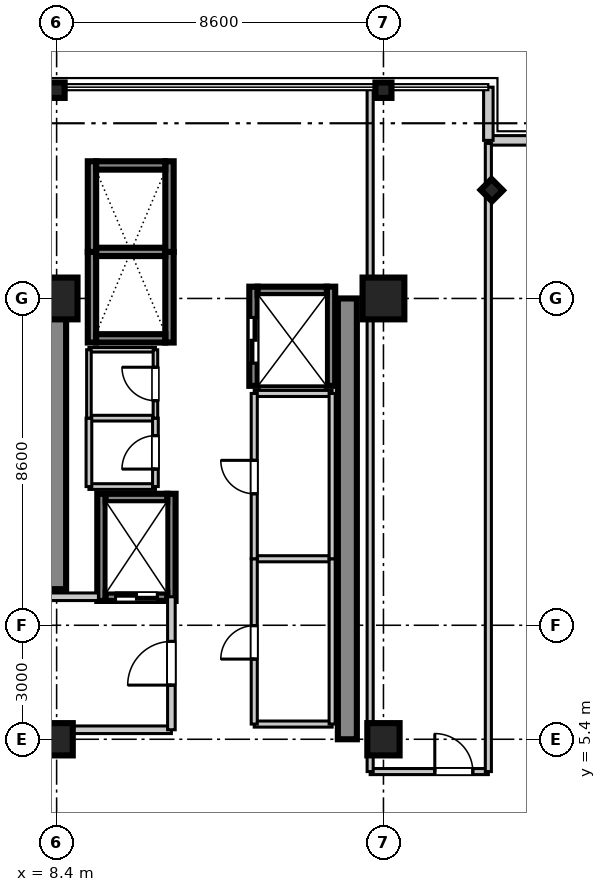
"""IFC4 building model, lengths in metres.
Left out: names, types, materials, properties, quantities, classifications, styles, units other than length and angle.
Written with IfcOpenShell. Run it as: python <this file> out.ifc"""

import sys

from ifc_helpers import new_model, si_unit, direction, frame, frame_2d, origin, origin_2d, place, context, subcontext, project, spatial, rectangle, i_section, extrude, source, transform, mapped, element, fill, save


model = new_model("IFC4")
c1 = context("Model", 3, precision=1e-05, world=origin(), true_north=direction((0.0, 1.0)))
c2 = subcontext(c1, "Body", "Model", "MODEL_VIEW")
j1 = project(units=[si_unit("LENGTHUNIT", "METRE"), si_unit("PLANEANGLEUNIT", "RADIAN")], contexts=[c1])
p1 = place(None, origin())
s1 = spatial("IfcSite", under=j1, at=p1, CompositionType="ELEMENT")
p2 = place(p1, origin())
s2 = spatial("IfcBuilding", under=s1, at=p2, CompositionType="ELEMENT")
p3 = place(p2, frame((0.0, 0.0, 185.5)))
s3 = spatial("IfcBuildingStorey", under=s2, at=p3, CompositionType="ELEMENT", Elevation=185.5)
m1 = source(origin(), c2, "Body", "SweptSolid", [
    extrude(rectangle(XDim=0.85, YDim=0.85, at=origin_2d()), origin(), (0.0, 0.0, 1.0), 3.605),
])
p4 = place(p3, frame((8.4, 5.4, 0.0), z_axis=(0.0, 0.0, 1.0), x_axis=(1.0, 0.0, 0.0)))
e1 = element("IfcColumn", 1, at=p4, inside=s3, PredefinedType="PILASTER", context=c2, shape_type="MappedRepresentation", body=[
    mapped(m1, transform((0.0, 0.0, 0.0), scale=1.0)),
])
m2 = source(origin(), c2, "Body", "SweptSolid", [
    extrude(rectangle(XDim=1.1, YDim=1.1, at=origin_2d()), origin(), (0.0, 0.0, 1.0), 3.605),
])
p5 = place(p3, frame((8.4, 17.0, 0.0), z_axis=(0.0, 0.0, 1.0), x_axis=(1.0, 0.0, 0.0)))
e2 = element("IfcColumn", 2, at=p5, inside=s3, PredefinedType="COLUMN", context=c2, shape_type="MappedRepresentation", body=[
    mapped(m2, transform((0.0, 0.0, 0.0), scale=1.0)),
])
p6 = place(p3, frame((17.0, 5.4, 0.0), z_axis=(0.0, 0.0, 1.0), x_axis=(1.0, 0.0, 0.0)))
e3 = element("IfcColumn", 3, at=p6, inside=s3, PredefinedType="PILASTER", context=c2, shape_type="MappedRepresentation", body=[
    mapped(m1, transform((0.0, 0.0, 0.0), scale=1.0)),
])
p7 = place(p3, frame((17.0, 17.0, 0.0), z_axis=(0.0, 0.0, 1.0), x_axis=(1.0, 0.0, 0.0)))
e4 = element("IfcColumn", 4, at=p7, inside=s3, PredefinedType="COLUMN", context=c2, shape_type="MappedRepresentation", body=[
    mapped(m2, transform((0.0, 0.0, 0.0), scale=1.0)),
])
m3 = source(origin(), c2, "Body", "SweptSolid", [
    extrude(i_section(OverallWidth=0.406, OverallDepth=0.422, WebThickness=0.019, FlangeThickness=0.03, at=origin_2d()), origin(), (0.0, 0.0, 1.0), 3.605),
])
for number, where, z_axis, x_axis in (
    (5, (8.4, 22.48, 0.0), (0.0, 0.0, 1.0), (0.0, 1.0, 0.0)),
    (6, (17.0, 22.48, 0.0), (0.0, 0.0, 1.0), (0.0, 1.0, 0.0)),
    (7, (19.85, 19.85, 0.0), (0.0, 0.0, 1.0), (0.707, 0.707, 0.0)),
):
    element("IfcColumn", number, at=place(p3, frame(where, z_axis=z_axis, x_axis=x_axis)), inside=s3, PredefinedType="COLUMN", context=c2, shape_type="MappedRepresentation", body=[
        mapped(m3, transform((0.0, 0.0, 0.0), scale=1.0)),
    ])
m4 = source(origin(), c2, "Body", "SweptSolid", [
    extrude(rectangle(XDim=7.65, YDim=0.5, at=frame_2d((3.825, 0.0))), origin(), (0.0, 0.0, 1.0), 3.39),
])
p8 = place(p3, frame((8.4, 9.35, 0.0), z_axis=(0.0, 0.0, 1.0), x_axis=(0.0, 1.0, 0.0)))
e8 = element("IfcWall", 8, at=p8, inside=s3, PredefinedType="SHEAR", context=c2, shape_type="MappedRepresentation", body=[
    mapped(m4, transform((0.0, 0.0, 0.0), scale=1.0)),
])
m5 = source(origin(), c2, "Body", "SweptSolid", [
    extrude(rectangle(XDim=11.6, YDim=0.5, at=frame_2d((5.8, 0.0))), origin(), (0.0, 0.0, 1.0), 3.39),
])
p9 = place(p3, frame((16.05, 5.4, 0.0), z_axis=(0.0, 0.0, 1.0), x_axis=(0.0, 1.0, 0.0)))
e9 = element("IfcWall", 9, at=p9, inside=s3, PredefinedType="SHEAR", context=c2, shape_type="MappedRepresentation", body=[
    mapped(m5, transform((0.0, 0.0, 0.0), scale=1.0)),
])
m6 = source(origin(), c2, "Body", "SweptSolid", [
    extrude(rectangle(XDim=2.385, YDim=0.22, at=frame_2d((1.192, 0.0))), origin(), (0.0, 0.0, 1.0), 3.39),
])
for number, where, z_axis, x_axis in (
    (10, (9.33, 15.84, 0.0), (0.0, 0.0, 1.0), (0.0, 1.0, 0.0)),
    (11, (11.37, 15.84, 0.0), (0.0, 0.0, 1.0), (0.0, 1.0, 0.0)),
):
    element("IfcWall", number, at=place(p3, frame(where, z_axis=z_axis, x_axis=x_axis)), inside=s3, PredefinedType="SHEAR", context=c2, shape_type="MappedRepresentation", body=[
        mapped(m6, transform((0.0, 0.0, 0.0), scale=1.0)),
    ])
m7 = source(origin(), c2, "Body", "SweptSolid", [
    extrude(rectangle(XDim=1.82, YDim=0.22, at=frame_2d((0.91, 0.0))), origin(), (0.0, 0.0, 1.0), 3.39),
])
p10 = place(p3, frame((9.44, 15.95, 0.0), z_axis=(0.0, 0.0, 1.0), x_axis=(1.0, 0.0, 0.0)))
e12 = element("IfcWall", 12, at=p10, inside=s3, PredefinedType="SHEAR", context=c2, shape_type="MappedRepresentation", body=[
    mapped(m7, transform((0.0, 0.0, 0.0), scale=1.0)),
])
m8 = source(origin(), c2, "Body", "SweptSolid", [
    extrude(rectangle(XDim=1.82, YDim=0.22, at=frame_2d((0.91, 0.0))), origin(), (0.0, 0.0, 1.0), 3.65),
])
p11 = place(p3, frame((9.44, 18.225, 0.0), z_axis=(0.0, 0.0, 1.0), x_axis=(1.0, 0.0, 0.0)))
e13 = element("IfcWall", 13, at=p11, inside=s3, PredefinedType="SHEAR", context=c2, shape_type="MappedRepresentation", body=[
    mapped(m8, transform((0.0, 0.0, 0.0), scale=1.0)),
])
for number, where, z_axis, x_axis in (
    (14, (9.33, 18.225, 0.0), (0.0, 0.0, 1.0), (0.0, 1.0, 0.0)),
    (15, (11.37, 18.225, 0.0), (0.0, 0.0, 1.0), (0.0, 1.0, 0.0)),
):
    element("IfcWall", number, at=place(p3, frame(where, z_axis=z_axis, x_axis=x_axis)), inside=s3, PredefinedType="SHEAR", context=c2, shape_type="MappedRepresentation", body=[
        mapped(m6, transform((0.0, 0.0, 0.0), scale=1.0)),
    ])
p12 = place(p3, frame((9.44, 20.5, 0.0), z_axis=(0.0, 0.0, 1.0), x_axis=(1.0, 0.0, 0.0)))
e16 = element("IfcWall", 16, at=p12, inside=s3, PredefinedType="SHEAR", context=c2, shape_type="MappedRepresentation", body=[
    mapped(m7, transform((0.0, 0.0, 0.0), scale=1.0)),
])
m9 = source(origin(), c2, "Body", "SweptSolid", [
    extrude(rectangle(XDim=2.82, YDim=0.22, at=frame_2d((1.41, 0.0))), origin(), (0.0, 0.0, 1.0), 3.39),
])
for number, where, z_axis, x_axis in (
    (17, (9.58, 9.04, 0.0), (0.0, 0.0, 1.0), (0.0, 1.0, 0.0)),
    (18, (11.42, 9.04, 0.0), (0.0, 0.0, 1.0), (0.0, 1.0, 0.0)),
):
    element("IfcWall", number, at=place(p3, frame(where, z_axis=z_axis, x_axis=x_axis)), inside=s3, PredefinedType="SHEAR", context=c2, shape_type="MappedRepresentation", body=[
        mapped(m9, transform((0.0, 0.0, 0.0), scale=1.0)),
    ])
m10 = source(origin(), c2, "Body", "SweptSolid", [
    extrude(rectangle(XDim=1.62, YDim=0.22, at=frame_2d((0.81, 0.0))), origin(), (0.0, 0.0, 1.0), 3.39),
])
p13 = place(p3, frame((9.69, 9.15, 0.0), z_axis=(0.0, 0.0, 1.0), x_axis=(1.0, 0.0, 0.0)))
e19 = element("IfcWall", 19, at=p13, inside=s3, PredefinedType="SHEAR", context=c2, shape_type="MappedRepresentation", body=[
    mapped(m10, transform((0.0, 0.0, 0.0), scale=1.0)),
])
p14 = place(p13, frame((0.26, 0.0, 0.0)))
e20 = element("IfcOpeningElement", 20, at=p14, cuts=e19, PredefinedType="OPENING", context=c2, shape_type="SweptSolid", body=[
    extrude(rectangle(XDim=1.1, YDim=2.2, at=frame_2d((0.55, 1.1))), frame((0.0, 0.12, 0.0), z_axis=(0.0, -1.0, 0.0), x_axis=(1.0, 0.0, 0.0)), (0.0, 0.0, 1.0), 0.24),
])
p15 = place(p3, frame((9.69, 11.75, 0.0), z_axis=(0.0, 0.0, 1.0), x_axis=(1.0, 0.0, 0.0)))
e21 = element("IfcWall", 21, at=p15, inside=s3, PredefinedType="SHEAR", context=c2, shape_type="MappedRepresentation", body=[
    mapped(m10, transform((0.0, 0.0, 0.0), scale=1.0)),
])
m11 = source(origin(), c2, "Body", "SweptSolid", [
    extrude(rectangle(XDim=2.61, YDim=0.22, at=frame_2d((1.305, 0.0))), origin(), (0.0, 0.0, 1.0), 3.39),
])
p16 = place(p3, frame((13.58, 14.7, 0.0), z_axis=(0.0, 0.0, 1.0), x_axis=(0.0, 1.0, 0.0)))
e22 = element("IfcWall", 22, at=p16, inside=s3, PredefinedType="SHEAR", context=c2, shape_type="MappedRepresentation", body=[
    mapped(m11, transform((0.0, 0.0, 0.0), scale=1.0)),
])
p17 = place(p16, frame((0.6, 0.0, 0.0)))
e23 = element("IfcOpeningElement", 23, at=p17, cuts=e22, PredefinedType="OPENING", context=c2, shape_type="SweptSolid", body=[
    extrude(rectangle(XDim=1.2, YDim=2.2, at=frame_2d((0.6, 1.1))), frame((0.0, 0.12, 0.0), z_axis=(0.0, -1.0, 0.0), x_axis=(1.0, 0.0, 0.0)), (0.0, 0.0, 1.0), 0.24),
])
p18 = place(p3, frame((15.62, 14.7, 0.0), z_axis=(0.0, 0.0, 1.0), x_axis=(0.0, 1.0, 0.0)))
e24 = element("IfcWall", 24, at=p18, inside=s3, PredefinedType="SHEAR", context=c2, shape_type="MappedRepresentation", body=[
    mapped(m11, transform((0.0, 0.0, 0.0), scale=1.0)),
])
p19 = place(p3, frame((13.69, 17.2, 0.0), z_axis=(0.0, 0.0, 1.0), x_axis=(1.0, 0.0, 0.0)))
e25 = element("IfcWall", 25, at=p19, inside=s3, PredefinedType="SHEAR", context=c2, shape_type="MappedRepresentation", body=[
    mapped(m7, transform((0.0, 0.0, 0.0), scale=1.0)),
])
m12 = source(origin(), c2, "Body", "SweptSolid", [
    extrude(rectangle(XDim=1.4, YDim=0.25, at=frame_2d((0.7, 0.0))), origin(), (0.0, 0.0, 1.0), 3.39),
])
p20 = place(p3, frame((19.76, 21.16, 0.0), z_axis=(0.0, 0.0, 1.0), x_axis=(1.0, 0.0, 0.0)))
e26 = element("IfcWall", 26, at=p20, inside=s3, PredefinedType="STANDARD", context=c2, shape_type="MappedRepresentation", body=[
    mapped(m12, transform((0.0, 0.0, 0.0), scale=1.0)),
])
m13 = source(origin(), c2, "Body", "SweptSolid", [
    extrude(rectangle(XDim=1.4, YDim=0.25, at=frame_2d((0.7, 0.0))), origin(), (0.0, 0.0, 1.0), 3.39),
])
p21 = place(p3, frame((19.76, 21.16, 0.0), z_axis=(0.0, 0.0, 1.0), x_axis=(0.0, 1.0, 0.0)))
e27 = element("IfcWall", 27, at=p21, inside=s3, PredefinedType="STANDARD", context=c2, shape_type="MappedRepresentation", body=[
    mapped(m13, transform((0.0, 0.0, 0.0), scale=1.0)),
])
m14 = source(origin(), c2, "Body", "SweptSolid", [
    extrude(rectangle(XDim=3.82, YDim=0.2, at=frame_2d((1.91, 0.0))), origin(), (0.0, 0.0, 1.0), 2.73),
])
p22 = place(p3, frame((7.6, 5.65, 0.0), z_axis=(0.0, 0.0, 1.0), x_axis=(1.0, 0.0, 0.0)))
e28 = element("IfcWall", 28, at=p22, inside=s3, PredefinedType="PARTITIONING", context=c2, shape_type="MappedRepresentation", body=[
    mapped(m14, transform((0.0, 0.0, 0.0), scale=1.0)),
])
m15 = source(origin(), c2, "Body", "SweptSolid", [
    extrude(rectangle(XDim=1.9, YDim=0.2, at=frame_2d((0.95, 0.0))), origin(), (0.0, 0.0, 1.0), 2.73),
])
p23 = place(p3, frame((7.6, 9.15, 0.0), z_axis=(0.0, 0.0, 1.0), x_axis=(1.0, 0.0, 0.0)))
e29 = element("IfcWall", 29, at=p23, inside=s3, PredefinedType="PARTITIONING", context=c2, shape_type="MappedRepresentation", body=[
    mapped(m15, transform((0.0, 0.0, 0.0), scale=1.0)),
])
m16 = source(origin(), c2, "Body", "SweptSolid", [
    extrude(rectangle(XDim=3.5, YDim=0.2, at=frame_2d((1.75, 0.0))), origin(), (0.0, 0.0, 1.0), 2.73),
])
p24 = place(p3, frame((11.42, 5.65, 0.0), z_axis=(0.0, 0.0, 1.0), x_axis=(0.0, 1.0, 0.0)))
e30 = element("IfcWall", 30, at=p24, inside=s3, PredefinedType="PARTITIONING", context=c2, shape_type="MappedRepresentation", body=[
    mapped(m16, transform((0.0, 0.0, 0.0), scale=1.0)),
])
p25 = place(p24, frame((1.175, 0.0, 0.0)))
e31 = element("IfcOpeningElement", 31, at=p25, cuts=e30, PredefinedType="OPENING", context=c2, shape_type="SweptSolid", body=[
    extrude(rectangle(XDim=1.15, YDim=2.15, at=frame_2d((0.575, 1.075))), frame((0.0, 0.11, 0.0), z_axis=(0.0, -1.0, 0.0), x_axis=(1.0, 0.0, 0.0)), (0.0, 0.0, 1.0), 0.22),
])
m17 = source(origin(), c2, "Body", "SweptSolid", [
    extrude(rectangle(XDim=1.75, YDim=0.15, at=frame_2d((0.875, 0.0))), origin(), (0.0, 0.0, 1.0), 2.73),
])
for number, where, z_axis, x_axis in (
    (32, (9.25, 12.05, 0.0), (0.0, 0.0, 1.0), (1.0, 0.0, 0.0)),
    (33, (9.25, 13.85, 0.0), (0.0, 0.0, 1.0), (1.0, 0.0, 0.0)),
):
    element("IfcWall", number, at=place(p3, frame(where, z_axis=z_axis, x_axis=x_axis)), inside=s3, PredefinedType="PARTITIONING", context=c2, shape_type="MappedRepresentation", body=[
        mapped(m17, transform((0.0, 0.0, 0.0), scale=1.0)),
    ])
m18 = source(origin(), c2, "Body", "SweptSolid", [
    extrude(rectangle(XDim=1.8, YDim=0.15, at=frame_2d((0.9, 0.0))), origin(), (0.0, 0.0, 1.0), 2.73),
])
p26 = place(p3, frame((9.25, 12.05, 0.0), z_axis=(0.0, 0.0, 1.0), x_axis=(0.0, 1.0, 0.0)))
e34 = element("IfcWall", 34, at=p26, inside=s3, PredefinedType="PARTITIONING", context=c2, shape_type="MappedRepresentation", body=[
    mapped(m18, transform((0.0, 0.0, 0.0), scale=1.0)),
])
p27 = place(p3, frame((11.0, 12.05, 0.0), z_axis=(0.0, 0.0, 1.0), x_axis=(0.0, 1.0, 0.0)))
e35 = element("IfcWall", 35, at=p27, inside=s3, PredefinedType="PARTITIONING", context=c2, shape_type="MappedRepresentation", body=[
    mapped(m18, transform((0.0, 0.0, 0.0), scale=1.0)),
])
p28 = place(p27, frame((0.46, 0.0, 0.0)))
e36 = element("IfcOpeningElement", 36, at=p28, cuts=e35, PredefinedType="OPENING", context=c2, shape_type="SweptSolid", body=[
    extrude(rectangle(XDim=0.88, YDim=2.1, at=frame_2d((0.44, 1.05))), frame((0.0, 0.085, 0.0), z_axis=(0.0, -1.0, 0.0), x_axis=(1.0, 0.0, 0.0)), (0.0, 0.0, 1.0), 0.17),
])
m19 = source(origin(), c2, "Body", "SweptSolid", [
    extrude(rectangle(XDim=1.75, YDim=0.12, at=frame_2d((0.875, 0.0))), origin(), (0.0, 0.0, 1.0), 2.73),
])
p29 = place(p3, frame((9.25, 15.65, 0.0), z_axis=(0.0, 0.0, 1.0), x_axis=(1.0, 0.0, 0.0)))
e37 = element("IfcWall", 37, at=p29, inside=s3, PredefinedType="PARTITIONING", context=c2, shape_type="MappedRepresentation", body=[
    mapped(m19, transform((0.0, 0.0, 0.0), scale=1.0)),
])
m20 = source(origin(), c2, "Body", "SweptSolid", [
    extrude(rectangle(XDim=1.8, YDim=0.12, at=frame_2d((0.9, 0.0))), origin(), (0.0, 0.0, 1.0), 2.73),
])
p30 = place(p3, frame((9.25, 13.85, 0.0), z_axis=(0.0, 0.0, 1.0), x_axis=(0.0, 1.0, 0.0)))
e38 = element("IfcWall", 38, at=p30, inside=s3, PredefinedType="PARTITIONING", context=c2, shape_type="MappedRepresentation", body=[
    mapped(m20, transform((0.0, 0.0, 0.0), scale=1.0)),
])
p31 = place(p3, frame((11.0, 13.85, 0.0), z_axis=(0.0, 0.0, 1.0), x_axis=(0.0, 1.0, 0.0)))
e39 = element("IfcWall", 39, at=p31, inside=s3, PredefinedType="PARTITIONING", context=c2, shape_type="MappedRepresentation", body=[
    mapped(m20, transform((0.0, 0.0, 0.0), scale=1.0)),
])
p32 = place(p31, frame((0.46, 0.0, 0.0)))
e40 = element("IfcOpeningElement", 40, at=p32, cuts=e39, PredefinedType="OPENING", context=c2, shape_type="SweptSolid", body=[
    extrude(rectangle(XDim=0.88, YDim=2.1, at=frame_2d((0.44, 1.05))), frame((0.0, 0.07, 0.0), z_axis=(0.0, -1.0, 0.0), x_axis=(1.0, 0.0, 0.0)), (0.0, 0.0, 1.0), 0.14),
])
m21 = source(origin(), c2, "Body", "SweptSolid", [
    extrude(rectangle(XDim=2.05, YDim=0.16, at=frame_2d((1.025, 0.0))), origin(), (0.0, 0.0, 1.0), 2.73),
])
for number, where, z_axis, x_axis in (
    (41, (13.6, 5.8, 0.0), (0.0, 0.0, 1.0), (1.0, 0.0, 0.0)),
    (42, (13.6, 10.15, 0.0), (0.0, 0.0, 1.0), (1.0, 0.0, 0.0)),
):
    element("IfcWall", number, at=place(p3, frame(where, z_axis=z_axis, x_axis=x_axis)), inside=s3, PredefinedType="PARTITIONING", context=c2, shape_type="MappedRepresentation", body=[
        mapped(m21, transform((0.0, 0.0, 0.0), scale=1.0)),
    ])
m22 = source(origin(), c2, "Body", "SweptSolid", [
    extrude(rectangle(XDim=4.35, YDim=0.16, at=frame_2d((2.175, 0.0))), origin(), (0.0, 0.0, 1.0), 2.73),
])
p33 = place(p3, frame((13.6, 5.8, 0.0), z_axis=(0.0, 0.0, 1.0), x_axis=(0.0, 1.0, 0.0)))
e43 = element("IfcWall", 43, at=p33, inside=s3, PredefinedType="PARTITIONING", context=c2, shape_type="MappedRepresentation", body=[
    mapped(m22, transform((0.0, 0.0, 0.0), scale=1.0)),
])
p34 = place(p33, frame((1.71, 0.0, 0.0)))
e44 = element("IfcOpeningElement", 44, at=p34, cuts=e43, PredefinedType="OPENING", context=c2, shape_type="SweptSolid", body=[
    extrude(rectangle(XDim=0.88, YDim=2.1, at=frame_2d((0.44, 1.05))), frame((0.0, 0.09, 0.0), z_axis=(0.0, -1.0, 0.0), x_axis=(1.0, 0.0, 0.0)), (0.0, 0.0, 1.0), 0.18),
])
p35 = place(p3, frame((15.65, 5.8, 0.0), z_axis=(0.0, 0.0, 1.0), x_axis=(0.0, 1.0, 0.0)))
e45 = element("IfcWall", 45, at=p35, inside=s3, PredefinedType="PARTITIONING", context=c2, shape_type="MappedRepresentation", body=[
    mapped(m22, transform((0.0, 0.0, 0.0), scale=1.0)),
])
p36 = place(p3, frame((13.6, 14.5, 0.0), z_axis=(0.0, 0.0, 1.0), x_axis=(1.0, 0.0, 0.0)))
e46 = element("IfcWall", 46, at=p36, inside=s3, PredefinedType="PARTITIONING", context=c2, shape_type="MappedRepresentation", body=[
    mapped(m21, transform((0.0, 0.0, 0.0), scale=1.0)),
])
m23 = source(origin(), c2, "Body", "SweptSolid", [
    extrude(rectangle(XDim=4.35, YDim=0.16, at=frame_2d((2.175, 0.0))), origin(), (0.0, 0.0, 1.0), 2.73),
])
p37 = place(p3, frame((13.6, 10.15, 0.0), z_axis=(0.0, 0.0, 1.0), x_axis=(0.0, 1.0, 0.0)))
e47 = element("IfcWall", 47, at=p37, inside=s3, PredefinedType="PARTITIONING", context=c2, shape_type="MappedRepresentation", body=[
    mapped(m23, transform((0.0, 0.0, 0.0), scale=1.0)),
])
p38 = place(p37, frame((1.71, 0.0, 0.0)))
e48 = element("IfcOpeningElement", 48, at=p38, cuts=e47, PredefinedType="OPENING", context=c2, shape_type="SweptSolid", body=[
    extrude(rectangle(XDim=0.88, YDim=2.1, at=frame_2d((0.44, 1.05))), frame((0.0, 0.09, 0.0), z_axis=(0.0, -1.0, 0.0), x_axis=(1.0, 0.0, 0.0)), (0.0, 0.0, 1.0), 0.18),
])
p39 = place(p3, frame((15.65, 10.15, 0.0), z_axis=(0.0, 0.0, 1.0), x_axis=(0.0, 1.0, 0.0)))
e49 = element("IfcWall", 49, at=p39, inside=s3, PredefinedType="PARTITIONING", context=c2, shape_type="MappedRepresentation", body=[
    mapped(m23, transform((0.0, 0.0, 0.0), scale=1.0)),
])
m24 = source(origin(), c2, "Body", "SweptSolid", [
    extrude(rectangle(XDim=3.11, YDim=0.16, at=frame_2d((1.555, 0.0))), origin(), (0.0, 0.0, 1.0), 2.73),
])
p40 = place(p3, frame((16.65, 4.55, 0.0), z_axis=(0.0, 0.0, 1.0), x_axis=(1.0, 0.0, 0.0)))
e50 = element("IfcWall", 50, at=p40, inside=s3, PredefinedType="PARTITIONING", context=c2, shape_type="MappedRepresentation", body=[
    mapped(m24, transform((0.0, 0.0, 0.0), scale=1.0)),
])
p41 = place(p40, frame((1.701, 0.0, 0.0)))
e51 = element("IfcOpeningElement", 51, at=p41, cuts=e50, PredefinedType="OPENING", context=c2, shape_type="SweptSolid", body=[
    extrude(rectangle(XDim=1.0, YDim=2.1, at=frame_2d((0.5, 1.05))), frame((0.0, 0.09, 0.0), z_axis=(0.0, -1.0, 0.0), x_axis=(1.0, 0.0, 0.0)), (0.0, 0.0, 1.0), 0.18),
])
m25 = source(origin(), c2, "Body", "SweptSolid", [
    extrude(rectangle(XDim=17.95, YDim=0.16, at=frame_2d((8.975, 0.0))), origin(), (0.0, 0.0, 1.0), 2.73),
])
p42 = place(p3, frame((16.65, 4.55, 0.0), z_axis=(0.0, 0.0, 1.0), x_axis=(0.0, 1.0, 0.0)))
e52 = element("IfcWall", 52, at=p42, inside=s3, PredefinedType="PARTITIONING", context=c2, shape_type="MappedRepresentation", body=[
    mapped(m25, transform((0.0, 0.0, 0.0), scale=1.0)),
])
m26 = source(origin(), c2, "Body", "SweptSolid", [
    extrude(rectangle(XDim=16.53, YDim=0.16, at=frame_2d((8.265, 0.0))), origin(), (0.0, 0.0, 1.0), 2.73),
])
p43 = place(p3, frame((19.76, 4.55, 0.0), z_axis=(0.0, 0.0, 1.0), x_axis=(0.0, 1.0, 0.0)))
e53 = element("IfcWall", 53, at=p43, inside=s3, PredefinedType="PARTITIONING", context=c2, shape_type="MappedRepresentation", body=[
    mapped(m26, transform((0.0, 0.0, 0.0), scale=1.0)),
])
m27 = source(origin(), c2, "Body", "SweptSolid", [
    extrude(rectangle(XDim=1.1, YDim=2.2, at=frame_2d((0.55, 1.1))), frame((0.0, 0.025, 0.0), z_axis=(0.0, -1.0, 0.0), x_axis=(1.0, 0.0, 0.0)), (0.0, 0.0, 1.0), 0.05),
])
p44 = place(p14, frame((1.1, 0.0, 0.0), z_axis=(0.0, 0.0, 1.0), x_axis=(-1.0, 0.0, 0.0)))
e54 = element("IfcDoor", 54, at=p44, inside=s3, OperationType="DOUBLE_DOOR_SLIDING", PredefinedType="DOOR", context=c2, shape_type="MappedRepresentation", body=[
    mapped(m27, transform((0.0, 0.0, 0.0), scale=1.0)),
])
fill(e20, e54)
m28 = source(origin(), c2, "Body", "SweptSolid", [
    extrude(rectangle(XDim=1.2, YDim=2.2, at=frame_2d((0.6, 1.1))), frame((0.0, 0.025, 0.0), z_axis=(0.0, -1.0, 0.0), x_axis=(1.0, 0.0, 0.0)), (0.0, 0.0, 1.0), 0.05),
])
p45 = place(p17, origin())
e55 = element("IfcDoor", 55, at=p45, inside=s3, OperationType="DOUBLE_DOOR_SLIDING", PredefinedType="DOOR", context=c2, shape_type="MappedRepresentation", body=[
    mapped(m28, transform((0.0, 0.0, 0.0), scale=1.0)),
])
fill(e23, e55)
m29 = source(origin(), c2, "Body", "SweptSolid", [
    extrude(rectangle(XDim=1.15, YDim=2.15, at=frame_2d((0.575, 1.075))), frame((0.0, 0.025, 0.0), z_axis=(0.0, -1.0, 0.0), x_axis=(1.0, 0.0, 0.0)), (0.0, 0.0, 1.0), 0.05),
])
p46 = place(p25, frame((1.15, 0.0, 0.0), z_axis=(0.0, 0.0, 1.0), x_axis=(-1.0, 0.0, 0.0)))
e56 = element("IfcDoor", 56, at=p46, inside=s3, OperationType="SINGLE_SWING_LEFT", PredefinedType="DOOR", context=c2, shape_type="MappedRepresentation", body=[
    mapped(m29, transform((0.0, 0.0, 0.0), scale=1.0)),
])
fill(e31, e56)
m30 = source(origin(), c2, "Body", "SweptSolid", [
    extrude(rectangle(XDim=0.88, YDim=2.1, at=frame_2d((0.44, 1.05))), frame((0.0, 0.025, 0.0), z_axis=(0.0, -1.0, 0.0), x_axis=(1.0, 0.0, 0.0)), (0.0, 0.0, 1.0), 0.05),
])
p47 = place(p28, origin())
e57 = element("IfcDoor", 57, at=p47, inside=s3, OperationType="SINGLE_SWING_LEFT", PredefinedType="DOOR", context=c2, shape_type="MappedRepresentation", body=[
    mapped(m30, transform((0.0, 0.0, 0.0), scale=1.0)),
])
fill(e36, e57)
p48 = place(p32, origin())
e58 = element("IfcDoor", 58, at=p48, inside=s3, OperationType="SINGLE_SWING_RIGHT", PredefinedType="DOOR", context=c2, shape_type="MappedRepresentation", body=[
    mapped(m30, transform((0.0, 0.0, 0.0), scale=1.0)),
])
fill(e40, e58)
p49 = place(p34, frame((0.88, 0.0, 0.0), z_axis=(0.0, 0.0, 1.0), x_axis=(-1.0, 0.0, 0.0)))
e59 = element("IfcDoor", 59, at=p49, inside=s3, OperationType="SINGLE_SWING_LEFT", PredefinedType="DOOR", context=c2, shape_type="MappedRepresentation", body=[
    mapped(m30, transform((0.0, 0.0, 0.0), scale=1.0)),
])
fill(e44, e59)
p50 = place(p38, frame((0.88, 0.0, 0.0), z_axis=(0.0, 0.0, 1.0), x_axis=(-1.0, 0.0, 0.0)))
e60 = element("IfcDoor", 60, at=p50, inside=s3, OperationType="SINGLE_SWING_RIGHT", PredefinedType="DOOR", context=c2, shape_type="MappedRepresentation", body=[
    mapped(m30, transform((0.0, 0.0, 0.0), scale=1.0)),
])
fill(e48, e60)
m31 = source(origin(), c2, "Body", "SweptSolid", [
    extrude(rectangle(XDim=1.0, YDim=2.1, at=frame_2d((0.5, 1.05))), frame((0.0, 0.025, 0.0), z_axis=(0.0, -1.0, 0.0), x_axis=(1.0, 0.0, 0.0)), (0.0, 0.0, 1.0), 0.05),
])
p51 = place(p41, origin())
e61 = element("IfcDoor", 61, at=p51, inside=s3, OperationType="SINGLE_SWING_LEFT", PredefinedType="DOOR", context=c2, shape_type="MappedRepresentation", body=[
    mapped(m31, transform((0.0, 0.0, 0.0), scale=1.0)),
])
fill(e51, e61)
save(model, sys.argv[1])
